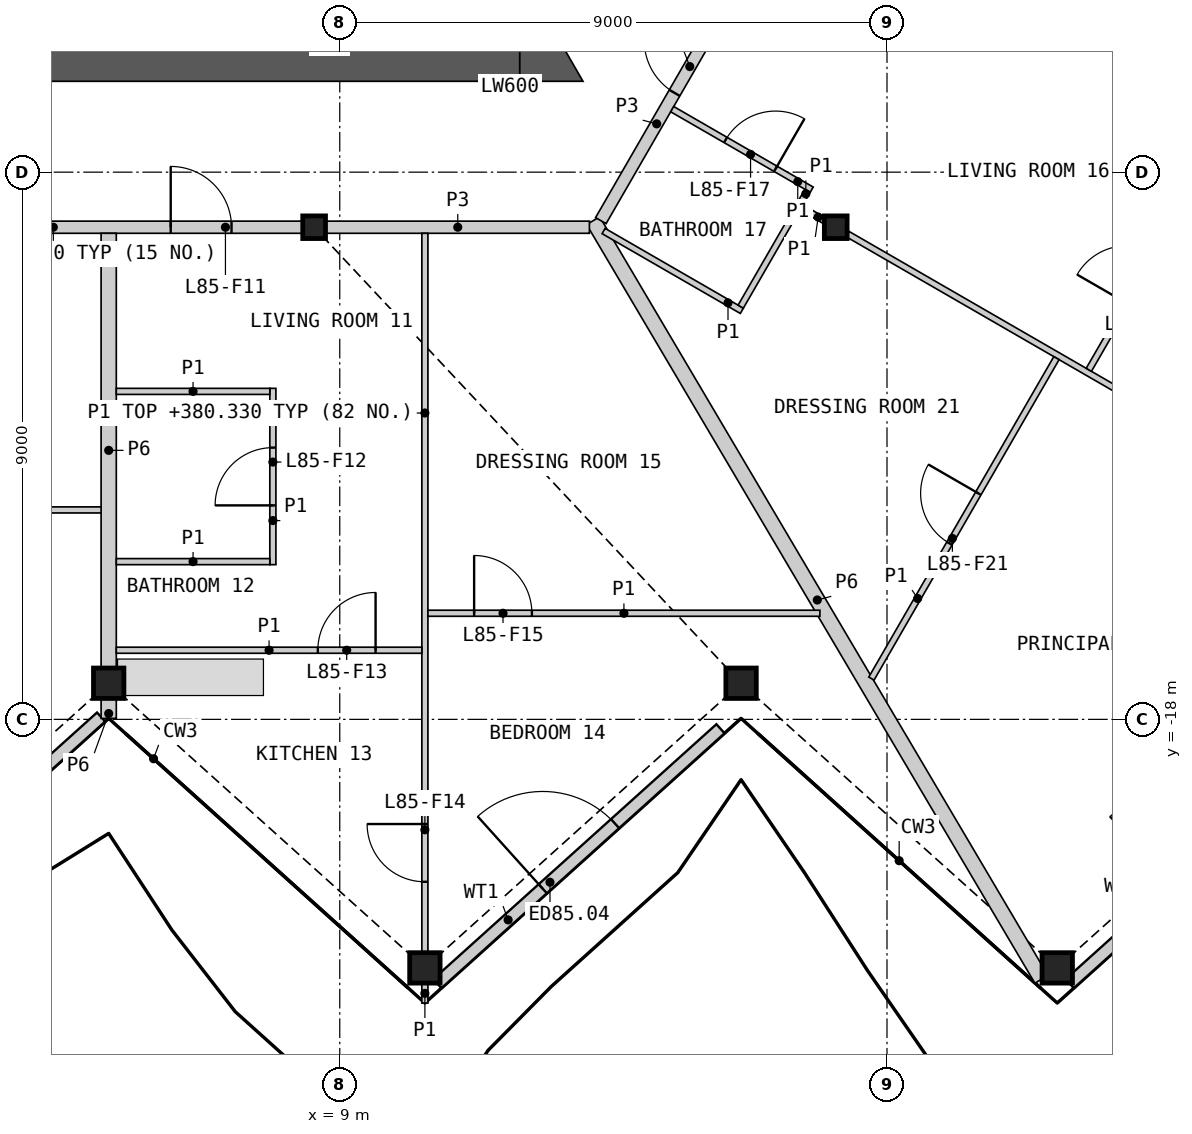
"""IFC4 building model, lengths in metres.
Left out: names, types, materials, properties, quantities, classifications, styles, units other than length and angle.
Written with IfcOpenShell. Run it as: python <this file> out.ifc"""

import sys

from ifc_helpers import new_model, si_unit, direction, frame, frame_2d, origin, origin_2d, place, context, subcontext, project, spatial, polyline, rectangle, hollow_rectangle, i_section, outline, extrude, element, fill, save


model = new_model("IFC4")
c1 = context("Model", 3, precision=1e-05, world=origin(), true_north=direction((0.0, 1.0)))
c2 = subcontext(c1, "Body", "Model", "MODEL_VIEW")
j1 = project(units=[si_unit("LENGTHUNIT", "METRE"), si_unit("PLANEANGLEUNIT", "RADIAN")], contexts=[c1])
p1 = place(None, origin())
s1 = spatial("IfcSite", under=j1, at=p1, CompositionType="ELEMENT")
p2 = place(p1, origin())
s2 = spatial("IfcBuilding", under=s1, at=p2, CompositionType="ELEMENT")
p3 = place(p2, frame((0.0, 0.0, 378.0)))
s3 = spatial("IfcBuildingStorey", under=s2, at=p3, CompositionType="ELEMENT", Elevation=378.0)
for number, where, z_axis, x_axis in (
    (1, (5.2, -17.406, 0.0), (0.0, 0.0, 1.0), (1.0, 0.0, 0.0)),
    (2, (10.4, -22.088, 0.0), (0.0, 0.0, 1.0), (1.0, 0.0, 0.0)),
    (3, (15.6, -17.406, 0.0), (0.0, 0.0, 1.0), (1.0, 0.0, 0.0)),
    (4, (20.8, -22.088, 0.0), (0.0, 0.0, 1.0), (1.0, 0.0, 0.0)),
):
    element("IfcColumn", number, at=place(p3, frame(where, z_axis=z_axis, x_axis=x_axis)), inside=s3, PredefinedType="COLUMN", context=c2, shape_type="SweptSolid", body=[
        extrude(hollow_rectangle(XDim=0.5, YDim=0.5, WallThickness=0.03, at=origin_2d()), origin(), (0.0, 0.0, 1.0), 3.4),
    ])
for number, where, z_axis, x_axis in (
    (5, (8.578, -9.906, 0.0), (0.0, 0.0, 1.0), (1.0, 0.0, 0.0)),
    (6, (17.157, -9.906, 0.0), (0.0, 0.0, 1.0), (1.0, 0.0, 0.0)),
):
    element("IfcColumn", number, at=place(p3, frame(where, z_axis=z_axis, x_axis=x_axis)), inside=s3, PredefinedType="COLUMN", context=c2, shape_type="SweptSolid", body=[
        extrude(i_section(OverallWidth=0.374, OverallDepth=0.372, WebThickness=0.016, FlangeThickness=0.026, at=origin_2d()), origin(), (0.0, 0.0, 1.0), 3.4),
    ])
p4 = place(p3, frame((0.205, -22.346, 0.0), z_axis=(0.0, 0.0, 1.0), x_axis=(0.74313295916, 0.669143785004, 0.0)))
e7 = element("IfcWall", 7, at=p4, inside=s3, PredefinedType="SOLIDWALL", context=c2, shape_type="SweptSolid", body=[
    extrude(rectangle(XDim=6.553, YDim=0.2, at=frame_2d((3.277, 0.0))), origin(), (0.0, 0.0, 1.0), 2.634),
])
p5 = place(p4, frame((2.333, 0.0, 0.0)))
e8 = element("IfcOpeningElement", 8, at=p5, cuts=e7, PredefinedType="OPENING", context=c2, shape_type="SweptSolid", body=[
    extrude(rectangle(XDim=1.6, YDim=2.25, at=frame_2d((0.8, 1.125))), frame((0.0, 0.11, 0.0), z_axis=(0.0, -1.0, 0.0), x_axis=(1.0, 0.0, 0.0)), (0.0, 0.0, 1.0), 0.22),
])
p6 = place(p3, frame((10.605, -22.346, 0.0), z_axis=(0.0, 0.0, 1.0), x_axis=(0.743137181878, 0.669139095339, 0.0)))
e9 = element("IfcWall", 9, at=p6, inside=s3, PredefinedType="SOLIDWALL", context=c2, shape_type="SweptSolid", body=[
    extrude(rectangle(XDim=6.265, YDim=0.2, at=frame_2d((3.133, 0.0))), origin(), (0.0, 0.0, 1.0), 2.634),
])
p7 = place(p6, frame((2.333, 0.0, 0.0)))
e10 = element("IfcOpeningElement", 10, at=p7, cuts=e9, PredefinedType="OPENING", context=c2, shape_type="SweptSolid", body=[
    extrude(rectangle(XDim=1.6, YDim=2.25, at=frame_2d((0.8, 1.125))), frame((0.0, 0.11, 0.0), z_axis=(0.0, -1.0, 0.0), x_axis=(1.0, 0.0, 0.0)), (0.0, 0.0, 1.0), 0.22),
])
p8 = place(p3, frame((21.005, -22.346, 0.0), z_axis=(0.0, 0.0, 1.0), x_axis=(0.743137181878, 0.669139095339, 0.0)))
e11 = element("IfcWall", 11, at=p8, inside=s3, PredefinedType="SOLIDWALL", context=c2, shape_type="SweptSolid", body=[
    extrude(rectangle(XDim=6.265, YDim=0.2, at=frame_2d((3.133, 0.0))), origin(), (0.0, 0.0, 1.0), 2.634),
])
p9 = place(p8, frame((2.333, 0.0, 0.0)))
e12 = element("IfcOpeningElement", 12, at=p9, cuts=e11, PredefinedType="OPENING", context=c2, shape_type="SweptSolid", body=[
    extrude(rectangle(XDim=1.6, YDim=2.25, at=frame_2d((0.8, 1.125))), frame((0.0, 0.11, 0.0), z_axis=(0.0, -1.0, 0.0), x_axis=(1.0, 0.0, 0.0)), (0.0, 0.0, 1.0), 0.22),
])
p10 = place(p3, frame((-4.892, -7.206, 0.0), z_axis=(0.0, 0.0, 1.0), x_axis=(1.0, 0.0, 0.0)))
e13 = element("IfcWall", 13, at=p10, inside=s3, PredefinedType="SHEAR", context=c2, shape_type="SweptSolid", body=[
    extrude(rectangle(XDim=16.853, YDim=0.6, at=frame_2d((8.426, 0.0))), origin(), (0.0, 0.0, 1.0), 3.1),
])
p11 = place(p3, origin())
e14 = element("IfcWall", 14, at=p11, inside=s3, PredefinedType="SHEAR", context=c2, shape_type="SweptSolid", body=[
    extrude(outline(polyline([(11.961, -7.506), (11.961, -6.906), (12.48, -6.606), (13.0, -7.506), (11.961, -7.506)])), origin(), (0.0, 0.0, 1.0), 3.1),
])
p12 = place(p3, frame((13.167, -9.798, 0.0), z_axis=(0.0, 0.0, 1.0), x_axis=(0.508707178493, -0.860939606796, 0.0)))
e15 = element("IfcWall", 15, at=p12, inside=s3, PredefinedType="PARTITIONING", context=c2, shape_type="SweptSolid", body=[
    extrude(rectangle(XDim=14.493, YDim=0.25, at=frame_2d((7.247, 0.0))), origin(), (0.0, 0.0, 1.0), 2.33),
])
p13 = place(p3, frame((0.197, -9.906, 0.0), z_axis=(0.0, 0.0, 1.0), x_axis=(1.0, 0.0, 0.0)))
e16 = element("IfcWall", 16, at=p13, inside=s3, PredefinedType="PARTITIONING", context=c2, shape_type="SweptSolid", body=[
    extrude(rectangle(XDim=8.185, YDim=0.2, at=frame_2d((4.092, 0.0))), origin(), (0.0, 0.0, 1.0), 3.1),
])
p14 = place(p13, frame((6.023, 0.0, 0.0)))
e17 = element("IfcOpeningElement", 17, at=p14, cuts=e16, PredefinedType="OPENING", context=c2, shape_type="SweptSolid", body=[
    extrude(rectangle(XDim=1.0, YDim=2.1, at=frame_2d((0.5, 1.05))), frame((0.0, 0.11, 0.0), z_axis=(0.0, -1.0, 0.0), x_axis=(1.0, 0.0, 0.0)), (0.0, 0.0, 1.0), 0.22),
])
p15 = place(p3, frame((5.2, -17.146, 0.0), z_axis=(0.0, 0.0, 1.0), x_axis=(0.0, 1.0, 0.0)))
e18 = element("IfcWall", 18, at=p15, inside=s3, PredefinedType="PARTITIONING", context=c2, shape_type="SweptSolid", body=[
    extrude(rectangle(XDim=7.14, YDim=0.25, at=frame_2d((3.57, 0.0))), origin(), (0.0, 0.0, 1.0), 2.33),
])
p16 = place(p3, frame((8.775, -9.906, 0.0), z_axis=(0.0, 0.0, 1.0), x_axis=(1.0, 0.0, 0.0)))
e19 = element("IfcWall", 19, at=p16, inside=s3, PredefinedType="PARTITIONING", context=c2, shape_type="SweptSolid", body=[
    extrude(rectangle(XDim=4.331, YDim=0.2, at=frame_2d((2.165, 0.0))), origin(), (0.0, 0.0, 1.0), 3.1),
])
p17 = place(p3, frame((13.293, -9.797, 0.0), z_axis=(0.0, 0.0, 1.0), x_axis=(0.499967746641, 0.866044024469, 0.0)))
e20 = element("IfcWall", 20, at=p17, inside=s3, PredefinedType="PARTITIONING", context=c2, shape_type="SweptSolid", body=[
    extrude(rectangle(XDim=3.676, YDim=0.2, at=frame_2d((1.838, 0.0))), origin(), (0.0, 0.0, 1.0), 3.1),
])
p18 = place(p17, frame((2.426, 0.0, 0.0)))
e21 = element("IfcOpeningElement", 21, at=p18, cuts=e20, PredefinedType="OPENING", context=c2, shape_type="SweptSolid", body=[
    extrude(rectangle(XDim=1.0, YDim=2.1, at=frame_2d((0.5, 1.05))), frame((0.0, 0.11, 0.0), z_axis=(0.0, -1.0, 0.0), x_axis=(1.0, 0.0, 0.0)), (0.0, 0.0, 1.0), 0.22),
])
p19 = place(p3, frame((5.2, -17.983, 0.0), z_axis=(0.0, 0.0, 1.0), x_axis=(0.0, 1.0, 0.0)))
e22 = element("IfcWall", 22, at=p19, inside=s3, PredefinedType="PARTITIONING", context=c2, shape_type="SweptSolid", body=[
    extrude(rectangle(XDim=0.318, YDim=0.25, at=frame_2d((0.159, 0.0))), origin(), (0.0, 0.0, 1.0), 2.33),
])
p20 = place(p3, frame((10.4, -21.828, 0.0), z_axis=(0.0, 0.0, 1.0), x_axis=(0.0, 1.0, 0.0)))
e23 = element("IfcWall", 23, at=p20, inside=s3, PredefinedType="PARTITIONING", context=c2, shape_type="SweptSolid", body=[
    extrude(rectangle(XDim=11.822, YDim=0.1, at=frame_2d((5.911, 0.0))), origin(), (0.0, 0.0, 1.0), 2.33),
])
p21 = place(p20, frame((1.156, 0.0, 0.0)))
e24 = element("IfcOpeningElement", 24, at=p21, cuts=e23, PredefinedType="OPENING", context=c2, shape_type="SweptSolid", body=[
    extrude(rectangle(XDim=0.95, YDim=2.1, at=frame_2d((0.475, 1.05))), frame((0.0, 0.06, 0.0), z_axis=(0.0, -1.0, 0.0), x_axis=(1.0, 0.0, 0.0)), (0.0, 0.0, 1.0), 0.12),
])
p22 = place(p3, frame((17.354, -10.019, 0.0), z_axis=(0.0, 0.0, 1.0), x_axis=(0.866019680922, -0.500009912158, 0.0)))
e25 = element("IfcWall", 25, at=p22, inside=s3, PredefinedType="PARTITIONING", context=c2, shape_type="SweptSolid", body=[
    extrude(rectangle(XDim=10.881, YDim=0.1, at=frame_2d((5.44, 0.0))), origin(), (0.0, 0.0, 1.0), 2.33),
])
p23 = place(p22, frame((8.276, 0.0, 0.0)))
e26 = element("IfcOpeningElement", 26, at=p23, cuts=e25, PredefinedType="OPENING", context=c2, shape_type="SweptSolid", body=[
    extrude(rectangle(XDim=0.95, YDim=2.1, at=frame_2d((0.475, 1.05))), frame((0.0, 0.06, 0.0), z_axis=(0.0, -1.0, 0.0), x_axis=(1.0, 0.0, 0.0)), (0.0, 0.0, 1.0), 0.12),
])
p24 = place(p3, frame((21.319, -12.251, 0.0), z_axis=(0.0, 0.0, 1.0), x_axis=(0.499999833739, 0.866025499775, 0.0)))
e27 = element("IfcWall", 27, at=p24, inside=s3, PredefinedType="PARTITIONING", context=c2, shape_type="SweptSolid", body=[
    extrude(rectangle(XDim=6.4, YDim=0.1, at=frame_2d((3.2, 0.0))), origin(), (0.0, 0.0, 1.0), 2.33),
])
p25 = place(p24, frame((1.26, 0.0, 0.0)))
e28 = element("IfcOpeningElement", 28, at=p25, cuts=e27, PredefinedType="OPENING", context=c2, shape_type="SweptSolid", body=[
    extrude(rectangle(XDim=0.95, YDim=2.1, at=frame_2d((0.475, 1.05))), frame((0.0, 0.06, 0.0), z_axis=(0.0, -1.0, 0.0), x_axis=(1.0, 0.0, 0.0)), (0.0, 0.0, 1.0), 0.12),
])
p26 = place(p3, frame((10.45, -16.255, 0.0), z_axis=(0.0, 0.0, 1.0), x_axis=(1.0, 0.0, 0.0)))
e29 = element("IfcWall", 29, at=p26, inside=s3, PredefinedType="PARTITIONING", context=c2, shape_type="SweptSolid", body=[
    extrude(rectangle(XDim=6.447, YDim=0.1, at=frame_2d((3.223, 0.0))), origin(), (0.0, 0.0, 1.0), 2.33),
])
p27 = place(p26, frame((0.76, 0.0, 0.0)))
e30 = element("IfcOpeningElement", 30, at=p27, cuts=e29, PredefinedType="OPENING", context=c2, shape_type="SweptSolid", body=[
    extrude(rectangle(XDim=0.95, YDim=2.1, at=frame_2d((0.475, 1.05))), frame((0.0, 0.06, 0.0), z_axis=(0.0, -1.0, 0.0), x_axis=(1.0, 0.0, 0.0)), (0.0, 0.0, 1.0), 0.12),
])
p28 = place(p3, frame((17.744, -17.329, 0.0), z_axis=(0.0, 0.0, 1.0), x_axis=(0.49997479812, 0.866039953608, 0.0)))
e31 = element("IfcWall", 31, at=p28, inside=s3, PredefinedType="PARTITIONING", context=c2, shape_type="SweptSolid", body=[
    extrude(rectangle(XDim=6.086, YDim=0.1, at=frame_2d((3.043, 0.0))), origin(), (0.0, 0.0, 1.0), 2.33),
])
p29 = place(p28, frame((2.568, 0.0, 0.0)))
e32 = element("IfcOpeningElement", 32, at=p29, cuts=e31, PredefinedType="OPENING", context=c2, shape_type="SweptSolid", body=[
    extrude(rectangle(XDim=0.95, YDim=2.1, at=frame_2d((0.475, 1.05))), frame((0.0, 0.06, 0.0), z_axis=(0.0, -1.0, 0.0), x_axis=(1.0, 0.0, 0.0)), (0.0, 0.0, 1.0), 0.12),
])
p30 = place(p3, frame((5.325, -16.863, 0.0), z_axis=(0.0, 0.0, 1.0), x_axis=(1.0, 0.0, 0.0)))
e33 = element("IfcWall", 33, at=p30, inside=s3, PredefinedType="PARTITIONING", context=c2, shape_type="SweptSolid", body=[
    extrude(rectangle(XDim=5.025, YDim=0.1, at=frame_2d((2.513, 0.0))), origin(), (0.0, 0.0, 1.0), 2.33),
])
p31 = place(p30, frame((3.314, 0.0, 0.0)))
e34 = element("IfcOpeningElement", 34, at=p31, cuts=e33, PredefinedType="OPENING", context=c2, shape_type="SweptSolid", body=[
    extrude(rectangle(XDim=0.95, YDim=2.1, at=frame_2d((0.475, 1.05))), frame((0.0, 0.06, 0.0), z_axis=(0.0, -1.0, 0.0), x_axis=(1.0, 0.0, 0.0)), (0.0, 0.0, 1.0), 0.12),
])
p32 = place(p3, frame((0.05, -14.555, 0.0), z_axis=(0.0, 0.0, 1.0), x_axis=(1.0, 0.0, 0.0)))
e35 = element("IfcWall", 35, at=p32, inside=s3, PredefinedType="PARTITIONING", context=c2, shape_type="SweptSolid", body=[
    extrude(rectangle(XDim=5.025, YDim=0.1, at=frame_2d((2.512, 0.0))), origin(), (0.0, 0.0, 1.0), 2.33),
])
p33 = place(p32, frame((0.863, 0.0, 0.0)))
e36 = element("IfcOpeningElement", 36, at=p33, cuts=e35, PredefinedType="OPENING", context=c2, shape_type="SweptSolid", body=[
    extrude(rectangle(XDim=0.95, YDim=2.1, at=frame_2d((0.475, 1.05))), frame((0.0, 0.06, 0.0), z_axis=(0.0, -1.0, 0.0), x_axis=(1.0, 0.0, 0.0)), (0.0, 0.0, 1.0), 0.12),
])
p34 = place(p3, frame((7.9, -15.456, 0.0), z_axis=(0.0, 0.0, 1.0), x_axis=(0.0, 1.0, 0.0)))
e37 = element("IfcWall", 37, at=p34, inside=s3, PredefinedType="PARTITIONING", context=c2, shape_type="SweptSolid", body=[
    extrude(rectangle(XDim=2.9, YDim=0.1, at=frame_2d((1.45, 0.0))), origin(), (0.0, 0.0, 1.0), 2.33),
])
p35 = place(p34, frame((0.975, 0.0, 0.0)))
e38 = element("IfcOpeningElement", 38, at=p35, cuts=e37, PredefinedType="OPENING", context=c2, shape_type="SweptSolid", body=[
    extrude(rectangle(XDim=0.95, YDim=2.1, at=frame_2d((0.475, 1.05))), frame((0.0, 0.06, 0.0), z_axis=(0.0, -1.0, 0.0), x_axis=(1.0, 0.0, 0.0)), (0.0, 0.0, 1.0), 0.12),
])
p36 = place(p3, frame((13.339, -9.968, 0.0), z_axis=(0.0, 0.0, 1.0), x_axis=(0.866013657776, -0.500020344131, 0.0)))
e39 = element("IfcWall", 39, at=p36, inside=s3, PredefinedType="PARTITIONING", context=c2, shape_type="SweptSolid", body=[
    extrude(rectangle(XDim=2.625, YDim=0.1, at=frame_2d((1.312, 0.0))), origin(), (0.0, 0.0, 1.0), 2.33),
])
for number, where, z_axis, x_axis in (
    (40, (5.325, -12.606, 0.0), (0.0, 0.0, 1.0), (1.0, 0.0, 0.0)),
    (41, (5.325, -15.406, 0.0), (0.0, 0.0, 1.0), (1.0, 0.0, 0.0)),
):
    element("IfcWall", number, at=place(p3, frame(where, z_axis=z_axis, x_axis=x_axis)), inside=s3, PredefinedType="PARTITIONING", context=c2, shape_type="SweptSolid", body=[
        extrude(rectangle(XDim=2.525, YDim=0.1, at=frame_2d((1.263, 0.0))), origin(), (0.0, 0.0, 1.0), 2.33),
    ])
p37 = place(p3, frame((14.467, -7.964, 0.0), z_axis=(0.0, 0.0, 1.0), x_axis=(0.866062824362, -0.499935180056, 0.0)))
e42 = element("IfcWall", 42, at=p37, inside=s3, PredefinedType="PARTITIONING", context=c2, shape_type="SweptSolid", body=[
    extrude(rectangle(XDim=2.649, YDim=0.1, at=frame_2d((1.325, 0.0))), origin(), (0.0, 0.0, 1.0), 2.33),
])
p38 = place(p37, frame((1.013, 0.0, 0.0)))
e43 = element("IfcOpeningElement", 43, at=p38, cuts=e42, PredefinedType="OPENING", context=c2, shape_type="SweptSolid", body=[
    extrude(rectangle(XDim=0.95, YDim=2.1, at=frame_2d((0.475, 1.05))), frame((0.0, 0.06, 0.0), z_axis=(0.0, -1.0, 0.0), x_axis=(1.0, 0.0, 0.0)), (0.0, 0.0, 1.0), 0.12),
])
p39 = place(p3, frame((15.594, -11.212, 0.0), z_axis=(0.0, 0.0, 1.0), x_axis=(0.499958068602, 0.866049611535, 0.0)))
e44 = element("IfcWall", 44, at=p39, inside=s3, PredefinedType="PARTITIONING", context=c2, shape_type="SweptSolid", body=[
    extrude(rectangle(XDim=1.973, YDim=0.1, at=frame_2d((0.987, 0.0))), origin(), (0.0, 0.0, 1.0), 2.33),
])
p40 = place(p3, frame((16.594, -9.581, 0.0), z_axis=(0.0, 0.0, 1.0), x_axis=(0.866137484628, -0.499805820016, 0.0)))
e45 = element("IfcWall", 45, at=p40, inside=s3, PredefinedType="PARTITIONING", context=c2, shape_type="SweptSolid", body=[
    extrude(rectangle(XDim=0.423, YDim=0.1, at=frame_2d((0.211, 0.0))), origin(), (0.0, 0.0, 1.0), 2.33),
])
p41 = place(p3, frame((10.4, -22.666, 0.0), z_axis=(0.0, 0.0, 1.0), x_axis=(0.0, 1.0, 0.0)))
e46 = element("IfcWall", 46, at=p41, inside=s3, PredefinedType="PARTITIONING", context=c2, shape_type="SweptSolid", body=[
    extrude(rectangle(XDim=0.318, YDim=0.1, at=frame_2d((0.159, 0.0))), origin(), (0.0, 0.0, 1.0), 2.33),
])
p42 = place(p3, frame((16.582, -9.501, 0.0), z_axis=(0.0, 0.0, 1.0), x_axis=(0.49742780181, 0.86750537865, 0.0)))
e47 = element("IfcWall", 47, at=p42, inside=s3, PredefinedType="PARTITIONING", context=c2, shape_type="SweptSolid", body=[
    extrude(rectangle(XDim=0.224, YDim=0.1, at=frame_2d((0.112, 0.0))), origin(), (0.0, 0.0, 1.0), 2.33),
])
p43 = place(p7, origin())
e48 = element("IfcDoor", 48, at=p43, inside=s3, OperationType="DOUBLE_DOOR_SINGLE_SWING", PredefinedType="DOOR", context=c2, shape_type="SweptSolid", body=[
    extrude(rectangle(XDim=1.6, YDim=2.25, at=frame_2d((0.8, 1.125))), frame((0.0, 0.025, 0.0), z_axis=(0.0, -1.0, 0.0), x_axis=(1.0, 0.0, 0.0)), (0.0, 0.0, 1.0), 0.05),
])
fill(e10, e48)
p44 = place(p14, origin())
e49 = element("IfcDoor", 49, at=p44, inside=s3, OperationType="SINGLE_SWING_LEFT", PredefinedType="DOOR", context=c2, shape_type="SweptSolid", body=[
    extrude(rectangle(XDim=1.0, YDim=2.1, at=frame_2d((0.5, 1.05))), frame((0.0, 0.025, 0.0), z_axis=(0.0, -1.0, 0.0), x_axis=(1.0, 0.0, 0.0)), (0.0, 0.0, 1.0), 0.05),
])
fill(e17, e49)
p45 = place(p35, origin())
e50 = element("IfcDoor", 50, at=p45, inside=s3, OperationType="SINGLE_SWING_LEFT", PredefinedType="DOOR", context=c2, shape_type="SweptSolid", body=[
    extrude(rectangle(XDim=0.95, YDim=2.1, at=frame_2d((0.475, 1.05))), frame((0.0, 0.025, 0.0), z_axis=(0.0, -1.0, 0.0), x_axis=(1.0, 0.0, 0.0)), (0.0, 0.0, 1.0), 0.05),
])
fill(e38, e50)
p46 = place(p31, origin())
e51 = element("IfcDoor", 51, at=p46, inside=s3, OperationType="SINGLE_SWING_RIGHT", PredefinedType="DOOR", context=c2, shape_type="SweptSolid", body=[
    extrude(rectangle(XDim=0.95, YDim=2.1, at=frame_2d((0.475, 1.05))), frame((0.0, 0.025, 0.0), z_axis=(0.0, -1.0, 0.0), x_axis=(1.0, 0.0, 0.0)), (0.0, 0.0, 1.0), 0.05),
])
fill(e34, e51)
p47 = place(p21, origin())
e52 = element("IfcDoor", 52, at=p47, inside=s3, OperationType="SINGLE_SWING_RIGHT", PredefinedType="DOOR", context=c2, shape_type="SweptSolid", body=[
    extrude(rectangle(XDim=0.95, YDim=2.1, at=frame_2d((0.475, 1.05))), frame((0.0, 0.025, 0.0), z_axis=(0.0, -1.0, 0.0), x_axis=(1.0, 0.0, 0.0)), (0.0, 0.0, 1.0), 0.05),
])
fill(e24, e52)
p48 = place(p27, origin())
e53 = element("IfcDoor", 53, at=p48, inside=s3, OperationType="SINGLE_SWING_LEFT", PredefinedType="DOOR", context=c2, shape_type="SweptSolid", body=[
    extrude(rectangle(XDim=0.95, YDim=2.1, at=frame_2d((0.475, 1.05))), frame((0.0, 0.025, 0.0), z_axis=(0.0, -1.0, 0.0), x_axis=(1.0, 0.0, 0.0)), (0.0, 0.0, 1.0), 0.05),
])
fill(e30, e53)
p49 = place(p18, origin())
e54 = element("IfcDoor", 54, at=p49, inside=s3, OperationType="SINGLE_SWING_RIGHT", PredefinedType="DOOR", context=c2, shape_type="SweptSolid", body=[
    extrude(rectangle(XDim=1.0, YDim=2.1, at=frame_2d((0.5, 1.05))), frame((0.0, 0.025, 0.0), z_axis=(0.0, -1.0, 0.0), x_axis=(1.0, 0.0, 0.0)), (0.0, 0.0, 1.0), 0.05),
])
fill(e21, e54)
p50 = place(p38, origin())
e55 = element("IfcDoor", 55, at=p50, inside=s3, OperationType="SINGLE_SWING_RIGHT", PredefinedType="DOOR", context=c2, shape_type="SweptSolid", body=[
    extrude(rectangle(XDim=0.95, YDim=2.1, at=frame_2d((0.475, 1.05))), frame((0.0, 0.025, 0.0), z_axis=(0.0, -1.0, 0.0), x_axis=(1.0, 0.0, 0.0)), (0.0, 0.0, 1.0), 0.05),
])
fill(e43, e55)
p51 = place(p29, origin())
e56 = element("IfcDoor", 56, at=p51, inside=s3, OperationType="SINGLE_SWING_RIGHT", PredefinedType="DOOR", context=c2, shape_type="SweptSolid", body=[
    extrude(rectangle(XDim=0.95, YDim=2.1, at=frame_2d((0.475, 1.05))), frame((0.0, 0.025, 0.0), z_axis=(0.0, -1.0, 0.0), x_axis=(1.0, 0.0, 0.0)), (0.0, 0.0, 1.0), 0.05),
])
fill(e32, e56)
save(model, sys.argv[1])
